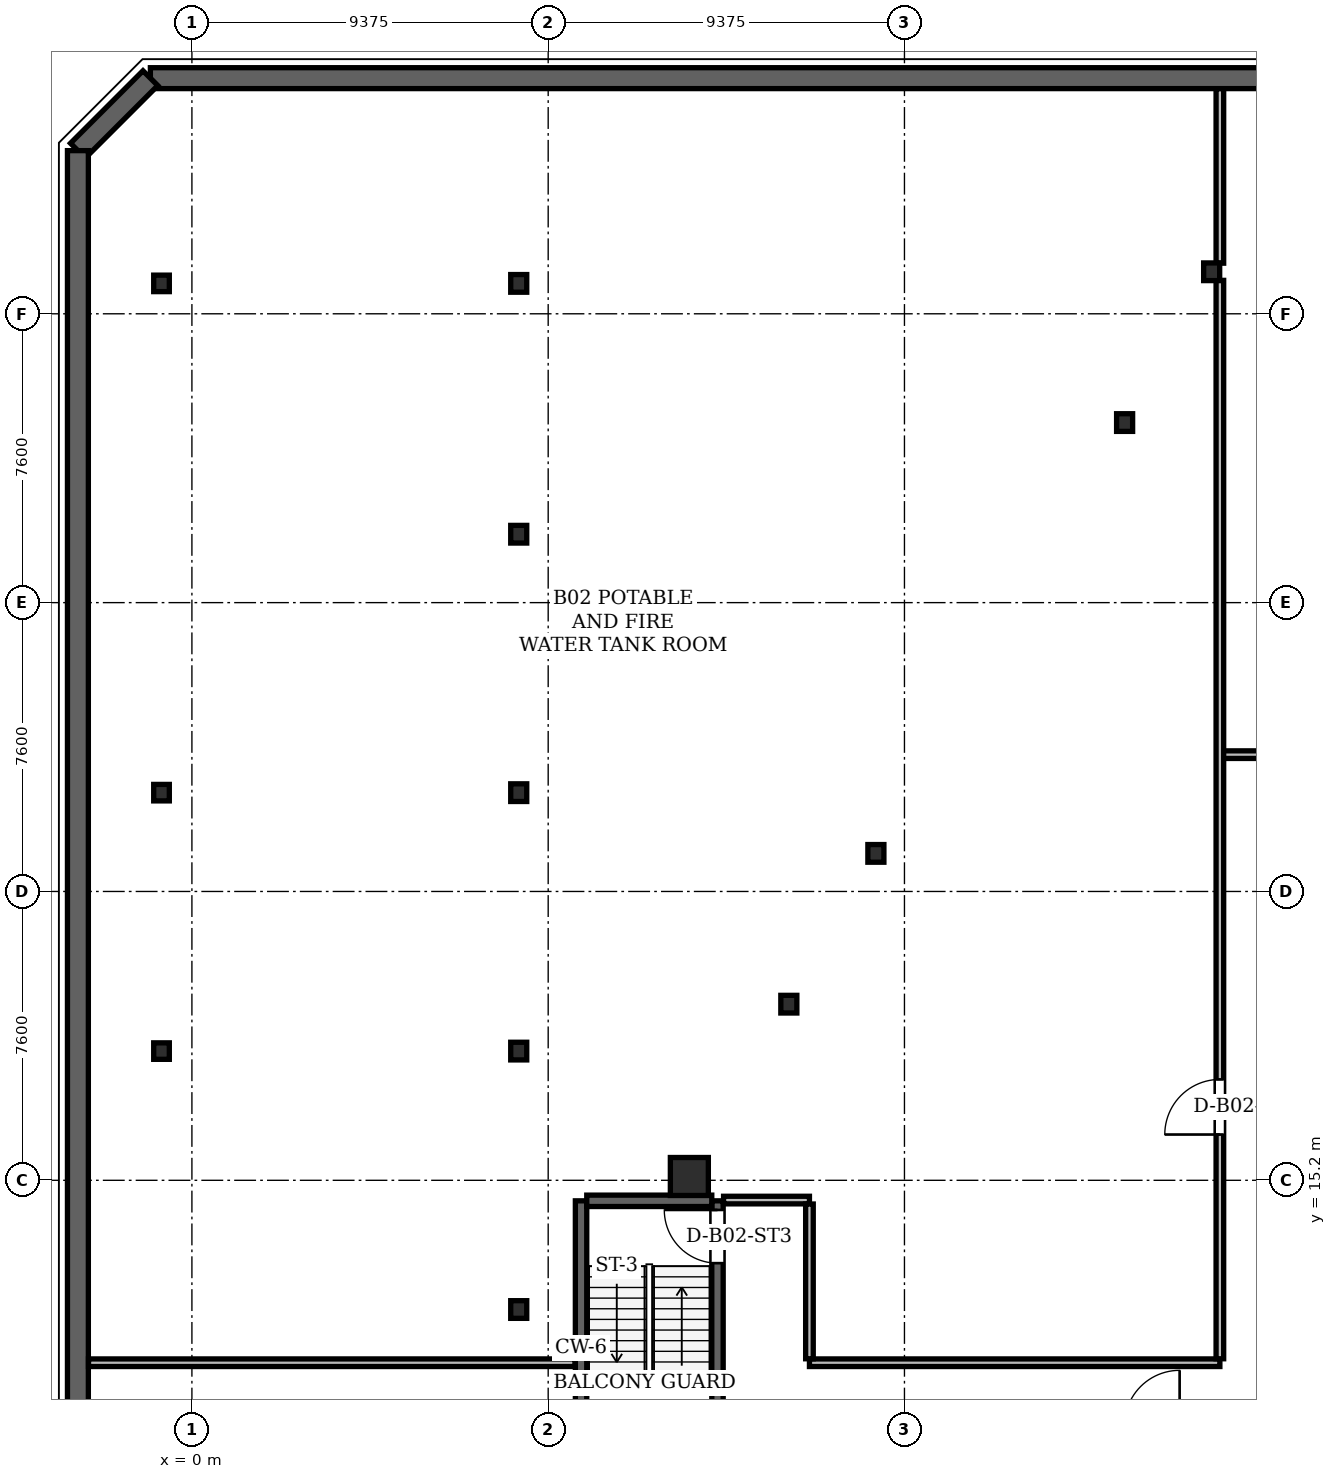
"""IFC4 building model, lengths in metres.
Left out: names, types, materials, properties, quantities, classifications, styles, units other than length and angle.
Written with IfcOpenShell. Run it as: python <this file> out.ifc"""

import sys

from ifc_helpers import new_model, si_unit, direction, frame, frame_2d, origin, origin_2d, place, context, subcontext, project, spatial, rectangle, hollow_rectangle, i_section, extrude, element, fill, save


model = new_model("IFC4")
c1 = context("Model", 3, precision=1e-05, world=origin(), true_north=direction((0.0, 1.0)))
c2 = subcontext(c1, "Body", "Model", "MODEL_VIEW")
j1 = project(units=[si_unit("LENGTHUNIT", "METRE"), si_unit("PLANEANGLEUNIT", "RADIAN")], contexts=[c1])
p1 = place(None, origin())
s1 = spatial("IfcSite", under=j1, at=p1, CompositionType="ELEMENT")
p2 = place(p1, origin())
s2 = spatial("IfcBuilding", under=s1, at=p2, CompositionType="ELEMENT")
p3 = place(p2, frame((0.0, 0.0, -8.0)))
s3 = spatial("IfcBuildingStorey", under=s2, at=p3, CompositionType="ELEMENT", Elevation=-8.0)
p4 = place(p3, frame((13.09, 15.3, 0.0), z_axis=(0.0, 0.0, 1.0), x_axis=(1.0, 0.0, 0.0)))
e1 = element("IfcColumn", 1, at=p4, inside=s3, PredefinedType="COLUMN", context=c2, shape_type="SweptSolid", body=[
    extrude(hollow_rectangle(XDim=1.0, YDim=1.0, WallThickness=0.085, at=origin_2d()), origin(), (0.0, 0.0, 1.0), 3.996),
])
for number, where, z_axis, x_axis in (
    (2, (26.834, 39.106, 0.0), (0.0, 0.0, 1.0), (1.0, 0.0, 0.0)),
    (3, (24.543, 35.138, 0.0), (0.0, 0.0, 1.0), (1.0, 0.0, 0.0)),
    (4, (17.998, 23.802, 0.0), (0.0, 0.0, 1.0), (1.0, 0.0, 0.0)),
    (5, (15.708, 19.834, 0.0), (0.0, 0.0, 1.0), (1.0, 0.0, 0.0)),
):
    element("IfcColumn", number, at=place(p3, frame(where, z_axis=z_axis, x_axis=x_axis)), inside=s3, PredefinedType="COLUMN", context=c2, shape_type="SweptSolid", body=[
        extrude(i_section(OverallWidth=0.422, OverallDepth=0.465, WebThickness=0.045, FlangeThickness=0.072, at=origin_2d()), origin(), (0.0, 0.0, 1.0), 3.996),
    ])
for number, where, z_axis, x_axis in (
    (6, (8.6, 11.8, 0.0), (0.0, 0.0, 1.0), (1.0, 0.0, 0.0)),
    (7, (8.6, 18.6, 0.0), (0.0, 0.0, 1.0), (1.0, 0.0, 0.0)),
    (8, (8.6, 25.4, 0.0), (0.0, 0.0, 1.0), (1.0, 0.0, 0.0)),
    (9, (8.6, 32.2, 0.0), (0.0, 0.0, 1.0), (1.0, 0.0, 0.0)),
    (10, (8.6, 38.8, 0.0), (0.0, 0.0, 1.0), (1.0, 0.0, 0.0)),
):
    element("IfcColumn", number, at=place(p3, frame(where, z_axis=z_axis, x_axis=x_axis)), inside=s3, PredefinedType="COLUMN", context=c2, shape_type="SweptSolid", body=[
        extrude(i_section(OverallWidth=0.422, OverallDepth=0.465, WebThickness=0.045, FlangeThickness=0.072, at=origin_2d()), origin(), (0.0, 0.0, 1.0), 4.0),
    ])
for number, where, z_axis, x_axis in (
    (11, (-0.8, 18.6, 0.0), (0.0, 0.0, 1.0), (1.0, 0.0, 0.0)),
    (12, (-0.8, 25.4, 0.0), (0.0, 0.0, 1.0), (1.0, 0.0, 0.0)),
    (13, (-0.8, 38.8, 0.0), (0.0, 0.0, 1.0), (1.0, 0.0, 0.0)),
):
    element("IfcColumn", number, at=place(p3, frame(where, z_axis=z_axis, x_axis=x_axis)), inside=s3, PredefinedType="COLUMN", context=c2, shape_type="SweptSolid", body=[
        extrude(i_section(OverallWidth=0.411, OverallDepth=0.434, WebThickness=0.036, FlangeThickness=0.057, at=origin_2d()), origin(), (0.0, 0.0, 1.0), 4.0),
    ])
p5 = place(p3, frame((10.24, 6.94, 0.0), z_axis=(0.0, 0.0, 1.0), x_axis=(0.0, 1.0, 0.0)))
e14 = element("IfcWall", 14, at=p5, inside=s3, PredefinedType="SHEAR", context=c2, shape_type="SweptSolid", body=[
    extrude(rectangle(XDim=7.72, YDim=0.3, at=frame_2d((3.86, 0.0))), origin(), (0.0, 0.0, 1.0), 3.72),
])
p6 = place(p3, frame((13.83, 6.94, 0.0), z_axis=(0.0, 0.0, 1.0), x_axis=(0.0, 1.0, 0.0)))
e15 = element("IfcWall", 15, at=p6, inside=s3, PredefinedType="SHEAR", context=c2, shape_type="SweptSolid", body=[
    extrude(rectangle(XDim=7.72, YDim=0.3, at=frame_2d((3.86, 0.0))), origin(), (0.0, 0.0, 1.0), 3.72),
])
p7 = place(p6, frame((6.08, 0.0, 0.0)))
e16 = element("IfcOpeningElement", 16, at=p7, cuts=e15, PredefinedType="OPENING", context=c2, shape_type="SweptSolid", body=[
    extrude(rectangle(XDim=1.4, YDim=2.2, at=frame_2d((0.7, 1.1))), frame((0.0, 0.15, 0.0), z_axis=(0.0, -1.0, 0.0), x_axis=(1.0, 0.0, 0.0)), (0.0, 0.0, 1.0), 0.3),
])
p8 = place(p3, frame((10.39, 14.66, 0.0), z_axis=(0.0, 0.0, 1.0), x_axis=(1.0, 0.0, 0.0)))
e17 = element("IfcWall", 17, at=p8, inside=s3, PredefinedType="SHEAR", context=c2, shape_type="SweptSolid", body=[
    extrude(rectangle(XDim=3.29, YDim=0.3, at=frame_2d((1.645, 0.0))), origin(), (0.0, 0.0, 1.0), 3.72),
])
p9 = place(p3, frame((76.093, 44.2, 0.0), z_axis=(0.0, 0.0, 1.0), x_axis=(-1.0, 0.0, 0.0)))
e18 = element("IfcWall", 18, at=p9, inside=s3, PredefinedType="USERDEFINED", context=c2, shape_type="SweptSolid", body=[
    extrude(rectangle(XDim=77.186, YDim=0.55, at=frame_2d((38.593, 0.0))), origin(), (0.0, 0.0, 1.0), 3.72),
])
p10 = place(p3, frame((-1.093, 44.2, 0.0), z_axis=(0.0, 0.0, 1.0), x_axis=(-0.707106781187, -0.707106781187, 0.0)))
e19 = element("IfcWall", 19, at=p10, inside=s3, PredefinedType="USERDEFINED", context=c2, shape_type="SweptSolid", body=[
    extrude(rectangle(XDim=2.697, YDim=0.55, at=frame_2d((1.348, 0.0))), origin(), (0.0, 0.0, 1.0), 3.72),
])
p11 = place(p3, frame((-3.0, 42.293, 0.0), z_axis=(0.0, 0.0, 1.0), x_axis=(0.0, -1.0, 0.0)))
e20 = element("IfcWall", 20, at=p11, inside=s3, PredefinedType="USERDEFINED", context=c2, shape_type="SweptSolid", body=[
    extrude(rectangle(XDim=38.986, YDim=0.55, at=frame_2d((19.493, 0.0))), origin(), (0.0, 0.0, 1.0), 3.72),
])
p12 = place(p3, frame((-2.721, 10.4, 0.0), z_axis=(0.0, 0.0, 1.0), x_axis=(1.0, 0.0, 0.0)))
e21 = element("IfcWall", 21, at=p12, inside=s3, PredefinedType="PARTITIONING", context=c2, shape_type="SweptSolid", body=[
    extrude(rectangle(XDim=12.801, YDim=0.2, at=frame_2d((6.4, 0.0))), origin(), (0.0, 0.0, 1.0), 2.783),
])
p13 = place(p3, frame((16.25, 10.4, 0.0), z_axis=(0.0, 0.0, 1.0), x_axis=(1.0, 0.0, 0.0)))
e22 = element("IfcWall", 22, at=p13, inside=s3, PredefinedType="PARTITIONING", context=c2, shape_type="SweptSolid", body=[
    extrude(rectangle(XDim=10.8, YDim=0.2, at=frame_2d((5.4, 0.0))), origin(), (0.0, 0.0, 1.0), 3.72),
])
p14 = place(p3, frame((13.99, 14.68, 0.0), z_axis=(0.0, 0.0, 1.0), x_axis=(1.0, 0.0, 0.0)))
e23 = element("IfcWall", 23, at=p14, inside=s3, PredefinedType="PARTITIONING", context=c2, shape_type="SweptSolid", body=[
    extrude(rectangle(XDim=2.26, YDim=0.2, at=frame_2d((1.13, 0.0))), origin(), (0.0, 0.0, 1.0), 2.783),
])
p15 = place(p3, frame((27.05, 26.4, 0.0), z_axis=(0.0, 0.0, 1.0), x_axis=(1.0, 0.0, 0.0)))
e24 = element("IfcWall", 24, at=p15, inside=s3, PredefinedType="PARTITIONING", context=c2, shape_type="SweptSolid", body=[
    extrude(rectangle(XDim=28.55, YDim=0.2, at=frame_2d((14.275, 0.0))), origin(), (0.0, 0.0, 1.0), 2.783),
])
p16 = place(p15, frame((13.55, 0.0, 0.0)))
e25 = element("IfcOpeningElement", 25, at=p16, cuts=e24, PredefinedType="OPENING", context=c2, shape_type="SweptSolid", body=[
    extrude(rectangle(XDim=1.45, YDim=2.25, at=frame_2d((0.725, 1.125))), frame((0.0, 0.1, 0.0), z_axis=(0.0, -1.0, 0.0), x_axis=(1.0, 0.0, 0.0)), (0.0, 0.0, 1.0), 0.2),
])
p17 = place(p3, frame((16.25, 10.504, 0.0), z_axis=(0.0, 0.0, 1.0), x_axis=(0.0, 1.0, 0.0)))
e26 = element("IfcWall", 26, at=p17, inside=s3, PredefinedType="PARTITIONING", context=c2, shape_type="SweptSolid", body=[
    extrude(rectangle(XDim=4.072, YDim=0.2, at=frame_2d((2.036, 0.0))), origin(), (0.0, 0.0, 1.0), 2.783),
])
p18 = place(p3, frame((27.05, 10.504, 0.0), z_axis=(0.0, 0.0, 1.0), x_axis=(0.0, 1.0, 0.0)))
e27 = element("IfcWall", 27, at=p18, inside=s3, PredefinedType="PARTITIONING", context=c2, shape_type="SweptSolid", body=[
    extrude(rectangle(XDim=28.376, YDim=0.2, at=frame_2d((14.188, 0.0))), origin(), (0.0, 0.0, 1.0), 2.783),
])
p19 = place(p18, frame((5.9, 0.0, 0.0)))
e28 = element("IfcOpeningElement", 28, at=p19, cuts=e27, PredefinedType="OPENING", context=c2, shape_type="SweptSolid", body=[
    extrude(rectangle(XDim=1.45, YDim=2.25, at=frame_2d((0.725, 1.125))), frame((0.0, 0.1, 0.0), z_axis=(0.0, -1.0, 0.0), x_axis=(1.0, 0.0, 0.0)), (0.0, 0.0, 1.0), 0.2),
])
p20 = place(p3, frame((27.05, 39.332, 0.0), z_axis=(0.0, 0.0, 1.0), x_axis=(0.0, 1.0, 0.0)))
e29 = element("IfcWall", 29, at=p20, inside=s3, PredefinedType="PARTITIONING", context=c2, shape_type="SweptSolid", body=[
    extrude(rectangle(XDim=4.589, YDim=0.2, at=frame_2d((2.295, 0.0))), origin(), (0.0, 0.0, 1.0), 2.854),
])
p21 = place(p7, origin())
e30 = element("IfcDoor", 30, at=p21, inside=s3, OperationType="SINGLE_SWING_RIGHT", PredefinedType="DOOR", context=c2, shape_type="SweptSolid", body=[
    extrude(rectangle(XDim=1.4, YDim=2.2, at=frame_2d((0.7, 1.1))), frame((0.0, 0.025, 0.0), z_axis=(0.0, -1.0, 0.0), x_axis=(1.0, 0.0, 0.0)), (0.0, 0.0, 1.0), 0.05),
])
fill(e16, e30)
p22 = place(p19, origin())
e31 = element("IfcDoor", 31, at=p22, inside=s3, OperationType="SINGLE_SWING_LEFT", PredefinedType="DOOR", context=c2, shape_type="SweptSolid", body=[
    extrude(rectangle(XDim=1.45, YDim=2.25, at=frame_2d((0.725, 1.125))), frame((0.0, 0.025, 0.0), z_axis=(0.0, -1.0, 0.0), x_axis=(1.0, 0.0, 0.0)), (0.0, 0.0, 1.0), 0.05),
])
fill(e28, e31)
save(model, sys.argv[1])
